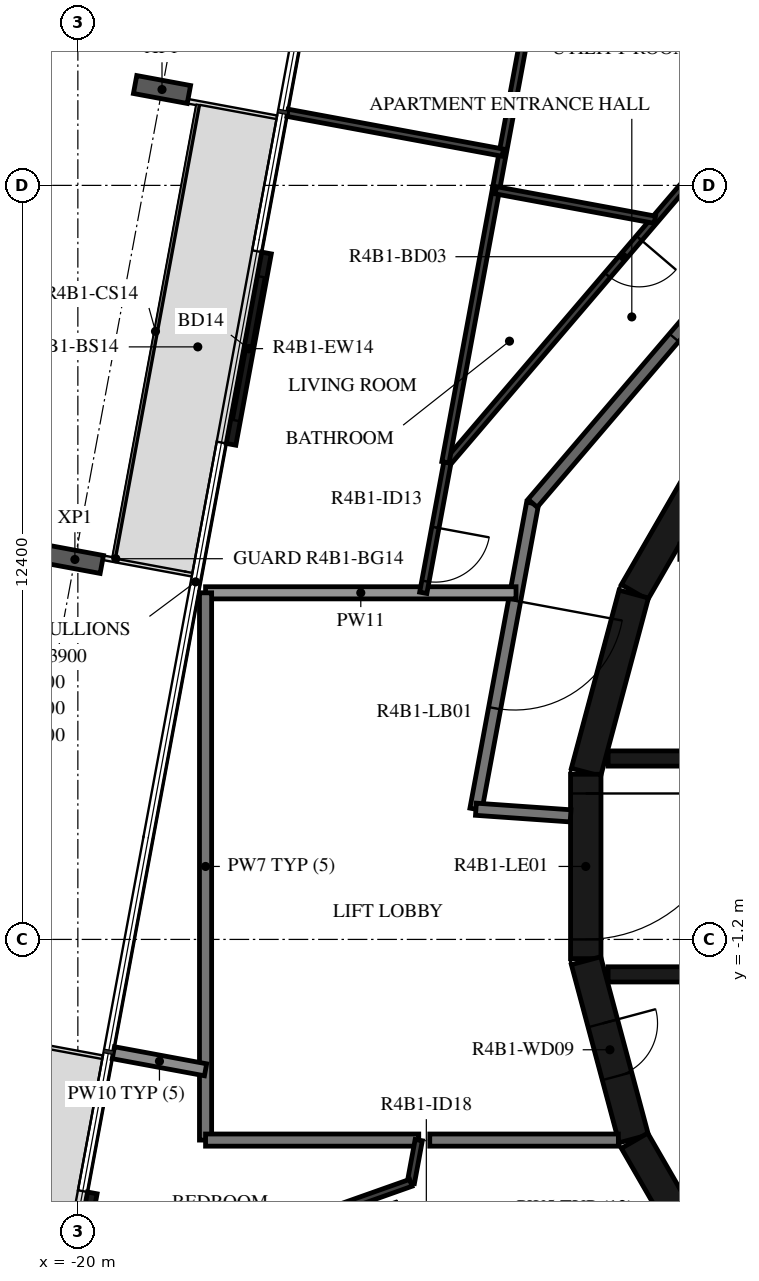
"""IFC4 building model, lengths in metres.
Left out: names, types, materials, properties, quantities, classifications, styles, units other than length and angle.
Written with IfcOpenShell. Run it as: python <this file> out.ifc"""

import sys

from ifc_helpers import new_model, si_unit, direction, frame, frame_2d, origin, origin_2d, place, context, subcontext, project, spatial, rectangle, i_section, extrude, element, fill, save


model = new_model("IFC4")
c1 = context("Model", 3, precision=1e-05, world=origin(), true_north=direction((0.0, 1.0)))
c2 = subcontext(c1, "Body", "Model", "MODEL_VIEW")
j1 = project(units=[si_unit("LENGTHUNIT", "METRE"), si_unit("PLANEANGLEUNIT", "RADIAN")], contexts=[c1])
p1 = place(None, origin())
s1 = spatial("IfcSite", under=j1, at=p1, CompositionType="ELEMENT")
p2 = place(p1, origin())
s2 = spatial("IfcBuilding", under=s1, at=p2, CompositionType="ELEMENT")
p3 = place(p2, frame((0.0, 0.0, 162.2)))
s3 = spatial("IfcBuildingStorey", under=s2, at=p3, CompositionType="ELEMENT", Elevation=162.2)
for number, where, z_axis, x_axis in (
    (1, (-18.616, 12.777, -0.38), (0.0, 0.0, 1.0), (0.182, 0.983, 0.0)),
    (2, (-20.049, 5.048, -0.38), (0.0, 0.0, 1.0), (0.182, 0.983, 0.0)),
):
    element("IfcColumn", number, at=place(p3, frame(where, z_axis=z_axis, x_axis=x_axis)), inside=s3, PredefinedType="COLUMN", context=c2, shape_type="SweptSolid", body=[
        extrude(i_section(OverallWidth=0.3, OverallDepth=0.9, WebThickness=0.019, FlangeThickness=0.035, FilletRadius=0.03, at=origin_2d()), origin(), (0.0, 0.0, 1.0), 3.5),
    ])
p4 = place(p3, frame((-16.897, 10.088, 0.0), z_axis=(0.0, 0.0, 1.0), x_axis=(-0.18226136951, -0.983250117307, 0.0)))
e3 = element("IfcWall", 3, at=p4, inside=s3, PredefinedType="STANDARD", context=c2, shape_type="SweptSolid", body=[
    extrude(rectangle(XDim=3.2, YDim=0.16, at=frame_2d((1.6, 0.0))), origin(), (0.0, 0.0, 1.0), 3.12),
])
p5 = place(p4, frame((0.4, 0.0, 0.0)))
e4 = element("IfcOpeningElement", 4, at=p5, cuts=e3, PredefinedType="OPENING", context=c2, shape_type="SweptSolid", body=[
    extrude(rectangle(XDim=2.4, YDim=2.4, at=frame_2d((1.2, 1.2))), frame((0.0, 0.09, 0.0), z_axis=(0.0, -1.0, 0.0), x_axis=(1.0, 0.0, 0.0)), (0.0, 0.0, 1.0), 0.18),
])
p6 = place(p3, frame((-19.762, -5.369, 0.0), z_axis=(0.0, 0.0, 1.0), x_axis=(-0.18226136951, -0.983250117307, 0.0)))
e5 = element("IfcWall", 5, at=p6, inside=s3, PredefinedType="STANDARD", context=c2, shape_type="SweptSolid", body=[
    extrude(rectangle(XDim=3.2, YDim=0.16, at=frame_2d((1.6, 0.0))), origin(), (0.0, 0.0, 1.0), 3.12),
])
p7 = place(p6, frame((0.4, 0.0, 0.0)))
e6 = element("IfcOpeningElement", 6, at=p7, cuts=e5, PredefinedType="OPENING", context=c2, shape_type="SweptSolid", body=[
    extrude(rectangle(XDim=2.4, YDim=2.4, at=frame_2d((1.2, 1.2))), frame((0.0, 0.09, 0.0), z_axis=(0.0, -1.0, 0.0), x_axis=(1.0, 0.0, 0.0)), (0.0, 0.0, 1.0), 0.18),
])
for number, where, z_axis, x_axis in (
    (7, (-9.329, 7.137, 0.0), (0.0, 0.0, 1.0), (-0.5, -0.866, 0.0)),
    (8, (-10.858, 4.479, 0.0), (0.0, 0.0, 1.0), (-0.259, -0.966, 0.0)),
):
    element("IfcWall", number, at=place(p3, frame(where, z_axis=z_axis, x_axis=x_axis)), inside=s3, PredefinedType="SHEAR", context=c2, shape_type="SweptSolid", body=[
        extrude(rectangle(XDim=3.033, YDim=0.5, at=frame_2d((1.516, 0.0))), origin(), (0.0, 0.0, 1.0), 3.12),
    ])
p8 = place(p3, frame((-11.647, 1.516, 0.0), z_axis=(0.0, 0.0, 1.0), x_axis=(0.0, -1.0, 0.0)))
e9 = element("IfcWall", 9, at=p8, inside=s3, PredefinedType="SHEAR", context=c2, shape_type="SweptSolid", body=[
    extrude(rectangle(XDim=3.033, YDim=0.5, at=frame_2d((1.516, 0.0))), origin(), (0.0, 0.0, 1.0), 3.12),
])
p9 = place(p8, frame((0.316, 0.0, 0.0)))
e10 = element("IfcOpeningElement", 10, at=p9, cuts=e9, PredefinedType="OPENING", context=c2, shape_type="SweptSolid", body=[
    extrude(rectangle(XDim=2.4, YDim=2.1, at=frame_2d((1.2, 1.05))), frame((0.0, 0.26, 0.0), z_axis=(0.0, -1.0, 0.0), x_axis=(1.0, 0.0, 0.0)), (0.0, 0.0, 1.0), 0.52),
])
p10 = place(p3, frame((-11.643, -1.55, 0.0), z_axis=(0.0, 0.0, 1.0), x_axis=(0.258734743916, -0.965948410781, 0.0)))
e11 = element("IfcWall", 11, at=p10, inside=s3, PredefinedType="SHEAR", context=c2, shape_type="SweptSolid", body=[
    extrude(rectangle(XDim=3.033, YDim=0.5, at=frame_2d((1.516, 0.0))), origin(), (0.0, 0.0, 1.0), 3.12),
])
p11 = place(p10, frame((1.066, 0.0, 0.0)))
e12 = element("IfcOpeningElement", 12, at=p11, cuts=e11, PredefinedType="OPENING", context=c2, shape_type="SweptSolid", body=[
    extrude(rectangle(XDim=0.9, YDim=2.1, at=frame_2d((0.45, 1.05))), frame((0.0, 0.26, 0.0), z_axis=(0.0, -1.0, 0.0), x_axis=(1.0, 0.0, 0.0)), (0.0, 0.0, 1.0), 0.52),
])
p12 = place(p3, frame((-10.845, -4.51, 0.0), z_axis=(0.0, 0.0, 1.0), x_axis=(0.500087131594, -0.865975092491, 0.0)))
e13 = element("IfcWall", 13, at=p12, inside=s3, PredefinedType="SHEAR", context=c2, shape_type="SweptSolid", body=[
    extrude(rectangle(XDim=3.033, YDim=0.5, at=frame_2d((1.516, 0.0))), origin(), (0.0, 0.0, 1.0), 3.12),
])
p13 = place(p3, frame((-11.28, 1.775, 0.0), z_axis=(0.0, 0.0, 1.0), x_axis=(1.0, 0.0, 0.0)))
e14 = element("IfcWall", 14, at=p13, inside=s3, PredefinedType="SHEAR", context=c2, shape_type="SweptSolid", body=[
    extrude(rectangle(XDim=14.38, YDim=0.25, at=frame_2d((7.19, 0.0))), origin(), (0.0, 0.0, 1.0), 3.12),
])
p14 = place(p13, frame((10.73, 0.0, 0.0)))
e15 = element("IfcOpeningElement", 15, at=p14, cuts=e14, PredefinedType="OPENING", context=c2, shape_type="SweptSolid", body=[
    extrude(rectangle(XDim=1.1, YDim=2.1, at=frame_2d((0.55, 1.05))), frame((0.0, 0.135, 0.0), z_axis=(0.0, -1.0, 0.0), x_axis=(1.0, 0.0, 0.0)), (0.0, 0.0, 1.0), 0.27),
])
p15 = place(p13, frame((12.88, 0.0, 0.0)))
e16 = element("IfcOpeningElement", 16, at=p15, cuts=e14, PredefinedType="OPENING", context=c2, shape_type="SweptSolid", body=[
    extrude(rectangle(XDim=1.1, YDim=2.1, at=frame_2d((0.55, 1.05))), frame((0.0, 0.135, 0.0), z_axis=(0.0, -1.0, 0.0), x_axis=(1.0, 0.0, 0.0)), (0.0, 0.0, 1.0), 0.27),
])
p16 = place(p13, frame((3.305, 0.0, 0.0)))
e17 = element("IfcOpeningElement", 17, at=p16, cuts=e14, PredefinedType="OPENING", context=c2, shape_type="SweptSolid", body=[
    extrude(rectangle(XDim=0.9, YDim=2.1, at=frame_2d((0.45, 1.05))), frame((0.0, 0.135, 0.0), z_axis=(0.0, -1.0, 0.0), x_axis=(1.0, 0.0, 0.0)), (0.0, 0.0, 1.0), 0.27),
])
p17 = place(p13, frame((7.605, 0.0, 0.0)))
e18 = element("IfcOpeningElement", 18, at=p17, cuts=e14, PredefinedType="OPENING", context=c2, shape_type="SweptSolid", body=[
    extrude(rectangle(XDim=0.9, YDim=2.1, at=frame_2d((0.45, 1.05))), frame((0.0, 0.135, 0.0), z_axis=(0.0, -1.0, 0.0), x_axis=(1.0, 0.0, 0.0)), (0.0, 0.0, 1.0), 0.27),
])
p18 = place(p3, frame((-11.28, -1.775, 0.0), z_axis=(0.0, 0.0, 1.0), x_axis=(1.0, 0.0, 0.0)))
e19 = element("IfcWall", 19, at=p18, inside=s3, PredefinedType="SHEAR", context=c2, shape_type="SweptSolid", body=[
    extrude(rectangle(XDim=14.38, YDim=0.25, at=frame_2d((7.19, 0.0))), origin(), (0.0, 0.0, 1.0), 3.12),
])
p19 = place(p18, frame((12.88, 0.0, 0.0)))
e20 = element("IfcOpeningElement", 20, at=p19, cuts=e19, PredefinedType="OPENING", context=c2, shape_type="SweptSolid", body=[
    extrude(rectangle(XDim=1.1, YDim=2.1, at=frame_2d((0.55, 1.05))), frame((0.0, 0.135, 0.0), z_axis=(0.0, -1.0, 0.0), x_axis=(1.0, 0.0, 0.0)), (0.0, 0.0, 1.0), 0.27),
])
p20 = place(p18, frame((8.68, 0.0, 0.0)))
e21 = element("IfcOpeningElement", 21, at=p20, cuts=e19, PredefinedType="OPENING", context=c2, shape_type="SweptSolid", body=[
    extrude(rectangle(XDim=0.9, YDim=2.1, at=frame_2d((0.45, 1.05))), frame((0.0, 0.135, 0.0), z_axis=(0.0, -1.0, 0.0), x_axis=(1.0, 0.0, 0.0)), (0.0, 0.0, 1.0), 0.27),
])
p21 = place(p3, frame((-12.521, 5.972, 0.0), z_axis=(0.0, 0.0, 1.0), x_axis=(-0.182251559718, -0.983251935661, 0.0)))
e22 = element("IfcWall", 22, at=p21, inside=s3, PredefinedType="STANDARD", context=c2, shape_type="SweptSolid", body=[
    extrude(rectangle(XDim=5.117, YDim=0.2, at=frame_2d((2.559, 0.0))), origin(), (0.0, 0.0, 1.0), 3.12),
])
p22 = place(p21, frame((1.627, 0.0, 0.0)))
e23 = element("IfcOpeningElement", 23, at=p22, cuts=e22, PredefinedType="OPENING", context=c2, shape_type="SweptSolid", body=[
    extrude(rectangle(XDim=1.8, YDim=2.1, at=frame_2d((0.9, 1.05))), frame((0.0, 0.11, 0.0), z_axis=(0.0, -1.0, 0.0), x_axis=(1.0, 0.0, 0.0)), (0.0, 0.0, 1.0), 0.22),
])
p23 = place(p3, frame((-13.454, 0.941, 0.0), z_axis=(0.0, 0.0, 1.0), x_axis=(0.99755155062, -0.069934997354, 0.0)))
e24 = element("IfcWall", 24, at=p23, inside=s3, PredefinedType="STANDARD", context=c2, shape_type="SweptSolid", body=[
    extrude(rectangle(XDim=1.561, YDim=0.2, at=frame_2d((0.78, 0.0))), origin(), (0.0, 0.0, 1.0), 3.12),
])
p24 = place(p3, frame((-7.858, 11.433, 0.0), z_axis=(0.0, 0.0, 1.0), x_axis=(-0.649440801937, -0.760412154545, 0.0)))
e25 = element("IfcWall", 25, at=p24, inside=s3, PredefinedType="STANDARD", context=c2, shape_type="SweptSolid", body=[
    extrude(rectangle(XDim=7.181, YDim=0.2, at=frame_2d((3.59, 0.0))), origin(), (0.0, 0.0, 1.0), 3.12),
])
p25 = place(p24, frame((2.6, 0.0, 0.0)))
e26 = element("IfcOpeningElement", 26, at=p25, cuts=e25, PredefinedType="OPENING", context=c2, shape_type="SweptSolid", body=[
    extrude(rectangle(XDim=1.0, YDim=2.1, at=frame_2d((0.5, 1.05))), frame((0.0, 0.11, 0.0), z_axis=(0.0, -1.0, 0.0), x_axis=(1.0, 0.0, 0.0)), (0.0, 0.0, 1.0), 0.22),
])
p26 = place(p3, frame((-12.794, 4.5, 0.0), z_axis=(0.0, 0.0, 1.0), x_axis=(-1.0, 0.0, 0.0)))
e27 = element("IfcWall", 27, at=p26, inside=s3, PredefinedType="STANDARD", context=c2, shape_type="SweptSolid", body=[
    extrude(rectangle(XDim=5.106, YDim=0.2, at=frame_2d((2.553, 0.0))), origin(), (0.0, 0.0, 1.0), 2.73),
])
p27 = place(p3, frame((-17.9, 4.5, 0.0), z_axis=(0.0, 0.0, 1.0), x_axis=(0.0, -1.0, 0.0)))
e28 = element("IfcWall", 28, at=p27, inside=s3, PredefinedType="STANDARD", context=c2, shape_type="SweptSolid", body=[
    extrude(rectangle(XDim=9.0, YDim=0.2, at=frame_2d((4.5, 0.0))), origin(), (0.0, 0.0, 1.0), 3.12),
])
p28 = place(p3, frame((-14.213, -4.5, 0.0), z_axis=(0.0, 0.0, 1.0), x_axis=(1.0, 0.0, 0.0)))
e29 = element("IfcWall", 29, at=p28, inside=s3, PredefinedType="STANDARD", context=c2, shape_type="SweptSolid", body=[
    extrude(rectangle(XDim=3.102, YDim=0.2, at=frame_2d((1.551, 0.0))), origin(), (0.0, 0.0, 1.0), 3.12),
])
p29 = place(p3, frame((-17.9, -4.5, 0.0), z_axis=(0.0, 0.0, 1.0), x_axis=(1.0, 0.0, 0.0)))
e30 = element("IfcWall", 30, at=p29, inside=s3, PredefinedType="STANDARD", context=c2, shape_type="SweptSolid", body=[
    extrude(rectangle(XDim=3.506, YDim=0.2, at=frame_2d((1.753, 0.0))), origin(), (0.0, 0.0, 1.0), 3.12),
])
p30 = place(p3, frame((-19.416, -3.063, 0.0), z_axis=(0.0, 0.0, 1.0), x_axis=(0.983258901558, -0.182213974512, 0.0)))
e31 = element("IfcWall", 31, at=p30, inside=s3, PredefinedType="STANDARD", context=c2, shape_type="SweptSolid", body=[
    extrude(rectangle(XDim=1.542, YDim=0.2, at=frame_2d((0.771, 0.0))), origin(), (0.0, 0.0, 1.0), 2.73),
])
p31 = place(p3, frame((-10.402, 15.882, 0.0), z_axis=(0.0, 0.0, 1.0), x_axis=(0.33382476952, -0.942635148536, 0.0)))
e32 = element("IfcWall", 32, at=p31, inside=s3, PredefinedType="PARTITIONING", context=c2, shape_type="SweptSolid", body=[
    extrude(rectangle(XDim=3.838, YDim=0.12, at=frame_2d((1.919, 0.0))), origin(), (0.0, 0.0, 1.0), 3.12),
])
p32 = place(p3, frame((-9.12, 12.264, 0.0), z_axis=(0.0, 0.0, 1.0), x_axis=(-0.649444490942, -0.760409003882, 0.0)))
e33 = element("IfcWall", 33, at=p32, inside=s3, PredefinedType="PARTITIONING", context=c2, shape_type="SweptSolid", body=[
    extrude(rectangle(XDim=7.395, YDim=0.12, at=frame_2d((3.697, 0.0))), origin(), (0.0, 0.0, 1.0), 3.12),
])
p33 = place(p32, frame((2.542, 0.0, 0.0)))
e34 = element("IfcOpeningElement", 34, at=p33, cuts=e33, PredefinedType="OPENING", context=c2, shape_type="SweptSolid", body=[
    extrude(rectangle(XDim=0.8, YDim=2.1, at=frame_2d((0.4, 1.05))), frame((0.0, 0.07, 0.0), z_axis=(0.0, -1.0, 0.0), x_axis=(1.0, 0.0, 0.0)), (0.0, 0.0, 1.0), 0.14),
])
p34 = place(p3, frame((-13.923, 6.641, 0.0), z_axis=(0.0, 0.0, 1.0), x_axis=(-0.182209715759, -0.983259690765, 0.0)))
e35 = element("IfcWall", 35, at=p34, inside=s3, PredefinedType="PARTITIONING", context=c2, shape_type="SweptSolid", body=[
    extrude(rectangle(XDim=2.177, YDim=0.12, at=frame_2d((1.089, 0.0))), origin(), (0.0, 0.0, 1.0), 3.12),
])
p35 = place(p34, frame((1.083, 0.0, 0.0)))
e36 = element("IfcOpeningElement", 36, at=p35, cuts=e35, PredefinedType="OPENING", context=c2, shape_type="SweptSolid", body=[
    extrude(rectangle(XDim=0.9, YDim=2.1, at=frame_2d((0.45, 1.05))), frame((0.0, 0.07, 0.0), z_axis=(0.0, -1.0, 0.0), x_axis=(1.0, 0.0, 0.0)), (0.0, 0.0, 1.0), 0.14),
])
p36 = place(p3, frame((-13.955, 6.647, 0.0), z_axis=(0.0, 0.0, 1.0), x_axis=(0.182264522222, 0.983249532896, 0.0)))
e37 = element("IfcWall", 37, at=p36, inside=s3, PredefinedType="PARTITIONING", context=c2, shape_type="SweptSolid", body=[
    extrude(rectangle(XDim=4.589, YDim=0.12, at=frame_2d((2.294, 0.0))), origin(), (0.0, 0.0, 1.0), 3.12),
])
p37 = place(p3, frame((-11.396, 20.453, 0.0), z_axis=(0.0, 0.0, 1.0), x_axis=(-0.182223370439, -0.983257160292, 0.0)))
e38 = element("IfcWall", 38, at=p37, inside=s3, PredefinedType="PARTITIONING", context=c2, shape_type="SweptSolid", body=[
    extrude(rectangle(XDim=9.452, YDim=0.12, at=frame_2d((4.726, 0.0))), origin(), (0.0, 0.0, 1.0), 3.12),
])
p38 = place(p37, frame((3.406, 0.0, 0.0)))
e39 = element("IfcOpeningElement", 39, at=p38, cuts=e38, PredefinedType="OPENING", context=c2, shape_type="SweptSolid", body=[
    extrude(rectangle(XDim=0.9, YDim=2.1, at=frame_2d((0.45, 1.05))), frame((0.0, 0.07, 0.0), z_axis=(0.0, -1.0, 0.0), x_axis=(1.0, 0.0, 0.0)), (0.0, 0.0, 1.0), 0.14),
])
p39 = place(p37, frame((0.2, 0.0, 0.0)))
e40 = element("IfcOpeningElement", 40, at=p39, cuts=e38, PredefinedType="OPENING", context=c2, shape_type="SweptSolid", body=[
    extrude(rectangle(XDim=0.9, YDim=2.1, at=frame_2d((0.45, 1.05))), frame((0.0, 0.07, 0.0), z_axis=(0.0, -1.0, 0.0), x_axis=(1.0, 0.0, 0.0)), (0.0, 0.0, 1.0), 0.14),
])
p40 = place(p3, frame((-13.126, 11.12, 0.0), z_axis=(0.0, 0.0, 1.0), x_axis=(0.983257646361, -0.182220747645, 0.0)))
e41 = element("IfcWall", 41, at=p40, inside=s3, PredefinedType="PARTITIONING", context=c2, shape_type="SweptSolid", body=[
    extrude(rectangle(XDim=2.659, YDim=0.12, at=frame_2d((1.33, 0.0))), origin(), (0.0, 0.0, 1.0), 3.12),
])
p41 = place(p3, frame((-16.552, 12.394, 0.0), z_axis=(0.0, 0.0, 1.0), x_axis=(0.983257712156, -0.182220392618, 0.0)))
e42 = element("IfcWall", 42, at=p41, inside=s3, PredefinedType="PARTITIONING", context=c2, shape_type="SweptSolid", body=[
    extrude(rectangle(XDim=3.6, YDim=0.12, at=frame_2d((1.8, 0.0))), origin(), (0.0, 0.0, 1.0), 2.73),
])
p42 = place(p3, frame((-14.394, -4.5, 0.0), z_axis=(0.0, 0.0, 1.0), x_axis=(-0.182101494457, -0.983279739299, 0.0)))
e43 = element("IfcWall", 43, at=p42, inside=s3, PredefinedType="PARTITIONING", context=c2, shape_type="SweptSolid", body=[
    extrude(rectangle(XDim=0.715, YDim=0.12, at=frame_2d((0.357, 0.0))), origin(), (0.0, 0.0, 1.0), 3.12),
])
p43 = place(p3, frame((-14.524, -5.203, 0.0), z_axis=(0.0, 0.0, 1.0), x_axis=(-0.942657704592, -0.333761070187, 0.0)))
e44 = element("IfcWall", 44, at=p43, inside=s3, PredefinedType="PARTITIONING", context=c2, shape_type="SweptSolid", body=[
    extrude(rectangle(XDim=1.208, YDim=0.12, at=frame_2d((0.604, 0.0))), origin(), (0.0, 0.0, 1.0), 3.12),
])
p44 = place(p5, origin())
e45 = element("IfcDoor", 45, at=p44, inside=s3, OperationType="DOUBLE_DOOR_SLIDING", PredefinedType="DOOR", context=c2, shape_type="SweptSolid", body=[
    extrude(rectangle(XDim=2.4, YDim=2.4, at=frame_2d((1.2, 1.2))), frame((0.0, 0.025, 0.0), z_axis=(0.0, -1.0, 0.0), x_axis=(1.0, 0.0, 0.0)), (0.0, 0.0, 1.0), 0.05),
])
fill(e4, e45)
p45 = place(p9, origin())
e46 = element("IfcDoor", 46, at=p45, inside=s3, OperationType="DOUBLE_DOOR_SINGLE_SWING", PredefinedType="DOOR", context=c2, shape_type="SweptSolid", body=[
    extrude(rectangle(XDim=2.4, YDim=2.1, at=frame_2d((1.2, 1.05))), frame((0.0, 0.025, 0.0), z_axis=(0.0, -1.0, 0.0), x_axis=(1.0, 0.0, 0.0)), (0.0, 0.0, 1.0), 0.05),
])
fill(e10, e46)
p46 = place(p11, origin())
e47 = element("IfcDoor", 47, at=p46, inside=s3, OperationType="SINGLE_SWING_LEFT", PredefinedType="DOOR", context=c2, shape_type="SweptSolid", body=[
    extrude(rectangle(XDim=0.9, YDim=2.1, at=frame_2d((0.45, 1.05))), frame((0.0, 0.025, 0.0), z_axis=(0.0, -1.0, 0.0), x_axis=(1.0, 0.0, 0.0)), (0.0, 0.0, 1.0), 0.05),
])
fill(e12, e47)
p47 = place(p25, origin())
e48 = element("IfcDoor", 48, at=p47, inside=s3, OperationType="SINGLE_SWING_LEFT", PredefinedType="DOOR", context=c2, shape_type="SweptSolid", body=[
    extrude(rectangle(XDim=1.0, YDim=2.1, at=frame_2d((0.5, 1.05))), frame((0.0, 0.025, 0.0), z_axis=(0.0, -1.0, 0.0), x_axis=(1.0, 0.0, 0.0)), (0.0, 0.0, 1.0), 0.05),
])
fill(e26, e48)
p48 = place(p33, origin())
e49 = element("IfcDoor", 49, at=p48, inside=s3, OperationType="SINGLE_SWING_LEFT", PredefinedType="DOOR", context=c2, shape_type="SweptSolid", body=[
    extrude(rectangle(XDim=0.8, YDim=2.1, at=frame_2d((0.4, 1.05))), frame((0.0, 0.025, 0.0), z_axis=(0.0, -1.0, 0.0), x_axis=(1.0, 0.0, 0.0)), (0.0, 0.0, 1.0), 0.05),
])
fill(e34, e49)
p49 = place(p35, origin())
e50 = element("IfcDoor", 50, at=p49, inside=s3, OperationType="SINGLE_SWING_LEFT", PredefinedType="DOOR", context=c2, shape_type="SweptSolid", body=[
    extrude(rectangle(XDim=0.9, YDim=2.1, at=frame_2d((0.45, 1.05))), frame((0.0, 0.025, 0.0), z_axis=(0.0, -1.0, 0.0), x_axis=(1.0, 0.0, 0.0)), (0.0, 0.0, 1.0), 0.05),
])
fill(e36, e50)
p50 = place(p22, origin())
e51 = element("IfcDoor", 51, at=p50, inside=s3, OperationType="DOUBLE_DOOR_SINGLE_SWING", PredefinedType="DOOR", context=c2, shape_type="SweptSolid", body=[
    extrude(rectangle(XDim=1.8, YDim=2.1, at=frame_2d((0.9, 1.05))), frame((0.0, 0.025, 0.0), z_axis=(0.0, -1.0, 0.0), x_axis=(1.0, 0.0, 0.0)), (0.0, 0.0, 1.0), 0.05),
])
fill(e23, e51)
save(model, sys.argv[1])
